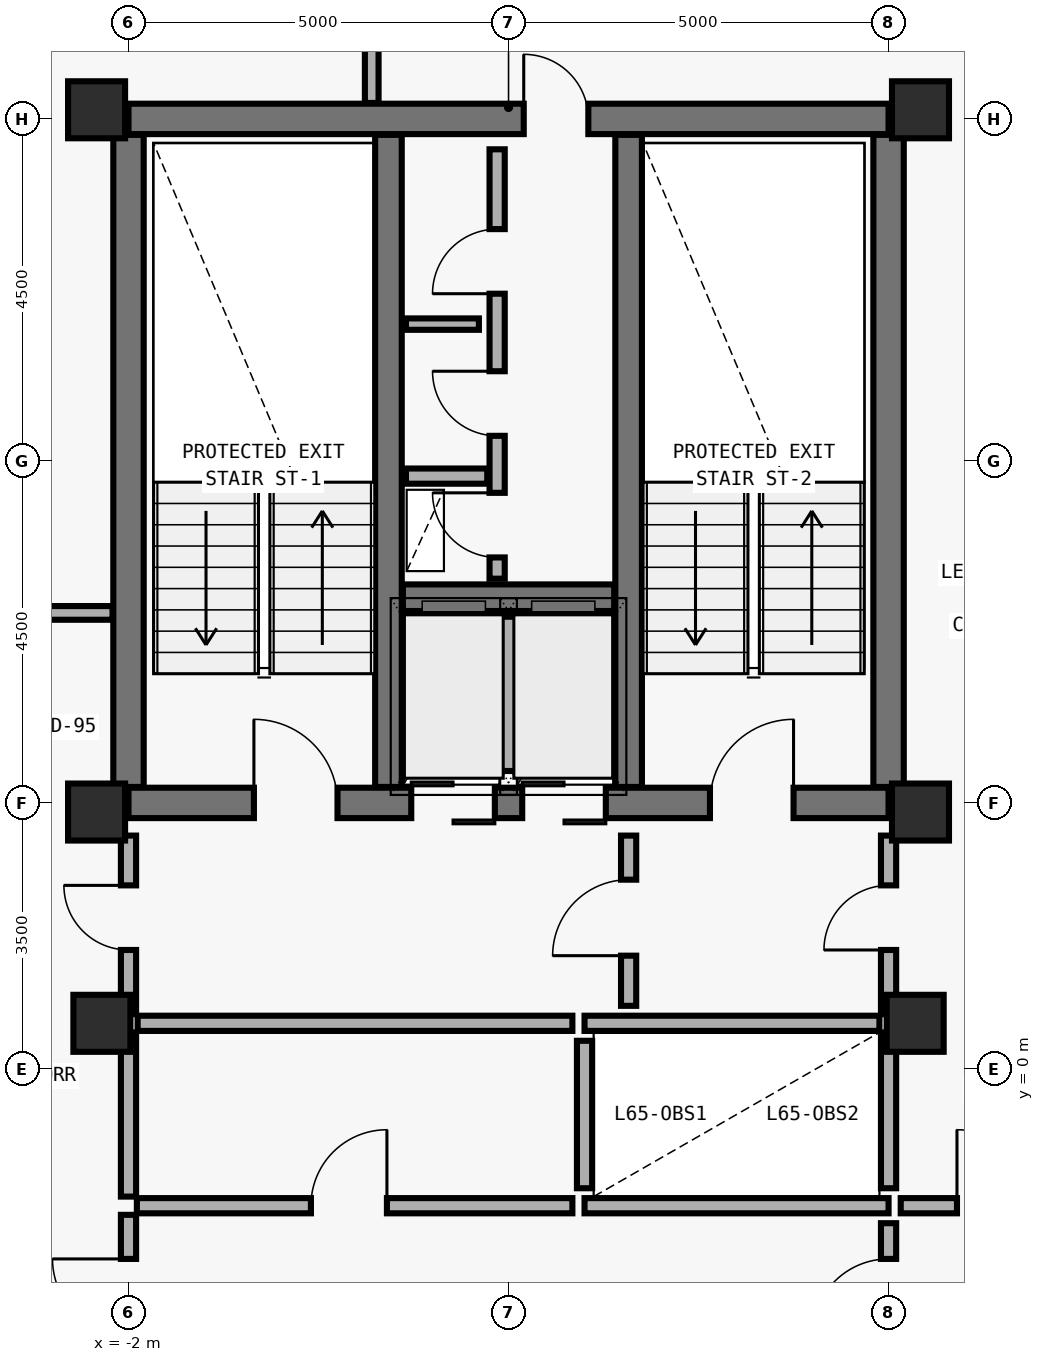
"""IFC4 building model, lengths in metres.
Left out: names, types, materials, properties, quantities, classifications, styles, units other than length and angle.
Written with IfcOpenShell. Run it as: python <this file> out.ifc"""

import sys

from ifc_helpers import new_model, si_unit, direction, frame, frame_2d, origin, origin_2d, place, context, subcontext, project, spatial, rectangle, extrude, element, fill, save


model = new_model("IFC4")
c1 = context("Model", 3, precision=1e-05, world=origin(), true_north=direction((0.0, 1.0)))
c2 = subcontext(c1, "Body", "Model", "MODEL_VIEW")
j1 = project(units=[si_unit("LENGTHUNIT", "METRE"), si_unit("PLANEANGLEUNIT", "RADIAN")], contexts=[c1])
p1 = place(None, origin())
s1 = spatial("IfcSite", under=j1, at=p1, CompositionType="ELEMENT")
p2 = place(p1, origin())
s2 = spatial("IfcBuilding", under=s1, at=p2, CompositionType="ELEMENT")
p3 = place(p2, frame((0.0, 0.0, 256.2)))
s3 = spatial("IfcBuildingStorey", under=s2, at=p3, CompositionType="ELEMENT", Elevation=256.2)
p4 = place(p3, frame((-2.0, 3.5, 0.0), z_axis=(0.0, 0.0, 1.0), x_axis=(1.0, 0.0, 0.0)))
e1 = element("IfcWall", 1, at=p4, inside=s3, PredefinedType="SHEAR", context=c2, shape_type="SweptSolid", body=[
    extrude(rectangle(XDim=10.0, YDim=0.4, at=frame_2d((5.0, 0.0))), origin(), (0.0, 0.0, 1.0), 3.592),
])
p5 = place(p4, frame((1.65, 0.0, 0.0)))
e2 = element("IfcOpeningElement", 2, at=p5, cuts=e1, PredefinedType="OPENING", context=c2, shape_type="SweptSolid", body=[
    extrude(rectangle(XDim=1.1, YDim=2.15, at=frame_2d((0.55, 1.075))), frame((0.0, 0.21, 0.0), z_axis=(0.0, -1.0, 0.0), x_axis=(1.0, 0.0, 0.0)), (0.0, 0.0, 1.0), 0.42),
])
p6 = place(p4, frame((7.65, 0.0, 0.0)))
e3 = element("IfcOpeningElement", 3, at=p6, cuts=e1, PredefinedType="OPENING", context=c2, shape_type="SweptSolid", body=[
    extrude(rectangle(XDim=1.1, YDim=2.15, at=frame_2d((0.55, 1.075))), frame((0.0, 0.21, 0.0), z_axis=(0.0, -1.0, 0.0), x_axis=(1.0, 0.0, 0.0)), (0.0, 0.0, 1.0), 0.42),
])
p7 = place(p4, frame((3.72, 0.0, 0.0)))
e4 = element("IfcOpeningElement", 4, at=p7, cuts=e1, PredefinedType="OPENING", context=c2, shape_type="SweptSolid", body=[
    extrude(rectangle(XDim=1.1, YDim=2.2, at=frame_2d((0.55, 1.1))), frame((0.0, 0.21, 0.0), z_axis=(0.0, -1.0, 0.0), x_axis=(1.0, 0.0, 0.0)), (0.0, 0.0, 1.0), 0.42),
])
p8 = place(p4, frame((5.18, 0.0, 0.0)))
e5 = element("IfcOpeningElement", 5, at=p8, cuts=e1, PredefinedType="OPENING", context=c2, shape_type="SweptSolid", body=[
    extrude(rectangle(XDim=1.1, YDim=2.2, at=frame_2d((0.55, 1.1))), frame((0.0, 0.21, 0.0), z_axis=(0.0, -1.0, 0.0), x_axis=(1.0, 0.0, 0.0)), (0.0, 0.0, 1.0), 0.42),
])
p9 = place(p3, frame((-2.0, 12.5, 0.0), z_axis=(0.0, 0.0, 1.0), x_axis=(1.0, 0.0, 0.0)))
e6 = element("IfcWall", 6, at=p9, inside=s3, PredefinedType="SHEAR", context=c2, shape_type="SweptSolid", body=[
    extrude(rectangle(XDim=10.0, YDim=0.4, at=frame_2d((5.0, 0.0))), origin(), (0.0, 0.0, 1.0), 3.592),
])
p10 = place(p9, frame((5.2, 0.0, 0.0)))
e7 = element("IfcOpeningElement", 7, at=p10, cuts=e6, PredefinedType="OPENING", context=c2, shape_type="SweptSolid", body=[
    extrude(rectangle(XDim=0.85, YDim=2.1, at=frame_2d((0.425, 1.05))), frame((0.0, 0.21, 0.0), z_axis=(0.0, -1.0, 0.0), x_axis=(1.0, 0.0, 0.0)), (0.0, 0.0, 1.0), 0.42),
])
for number, where, z_axis, x_axis in (
    (8, (-2.0, 3.71, 0.0), (0.0, 0.0, 1.0), (0.0, 1.0, 0.0)),
    (9, (8.0, 3.71, 0.0), (0.0, 0.0, 1.0), (0.0, 1.0, 0.0)),
):
    element("IfcWall", number, at=place(p3, frame(where, z_axis=z_axis, x_axis=x_axis)), inside=s3, PredefinedType="SHEAR", context=c2, shape_type="SweptSolid", body=[
        extrude(rectangle(XDim=8.58, YDim=0.4, at=frame_2d((4.29, 0.0))), origin(), (0.0, 0.0, 1.0), 3.592),
    ])
for number, where, z_axis, x_axis in (
    (10, (1.42, 3.71, 0.0), (0.0, 0.0, 1.0), (0.0, 1.0, 0.0)),
    (11, (4.58, 3.71, 0.0), (0.0, 0.0, 1.0), (0.0, 1.0, 0.0)),
):
    element("IfcWall", number, at=place(p3, frame(where, z_axis=z_axis, x_axis=x_axis)), inside=s3, PredefinedType="SHEAR", context=c2, shape_type="SweptSolid", body=[
        extrude(rectangle(XDim=8.58, YDim=0.35, at=frame_2d((4.29, 0.0))), origin(), (0.0, 0.0, 1.0), 3.592),
    ])
p11 = place(p3, frame((1.61, 6.2, 0.0), z_axis=(0.0, 0.0, 1.0), x_axis=(1.0, 0.0, 0.0)))
e12 = element("IfcWall", 12, at=p11, inside=s3, PredefinedType="SHEAR", context=c2, shape_type="SweptSolid", body=[
    extrude(rectangle(XDim=2.78, YDim=0.35, at=frame_2d((1.39, 0.0))), origin(), (0.0, 0.0, 1.0), 3.592),
])
for number, where, z_axis, x_axis in (
    (13, (-2.42, 12.62, 0.0), (0.0, 0.0, 1.0), (1.0, 0.0, 0.0)),
    (14, (8.42, 12.62, 0.0), (0.0, 0.0, 1.0), (1.0, 0.0, 0.0)),
    (15, (-2.42, 3.38, 0.0), (0.0, 0.0, 1.0), (1.0, 0.0, 0.0)),
    (16, (8.42, 3.38, 0.0), (0.0, 0.0, 1.0), (1.0, 0.0, 0.0)),
    (17, (-2.35, 0.6, 0.0), (0.0, 0.0, 1.0), (1.0, 0.0, 0.0)),
    (18, (8.35, 0.6, 0.0), (0.0, 0.0, 1.0), (1.0, 0.0, 0.0)),
):
    element("IfcColumn", number, at=place(p3, frame(where, z_axis=z_axis, x_axis=x_axis)), inside=s3, PredefinedType="COLUMN", context=c2, shape_type="SweptSolid", body=[
        extrude(rectangle(XDim=0.75, YDim=0.75, at=origin_2d()), origin(), (0.0, 0.0, 1.0), 3.575),
    ])
p12 = place(p3, frame((3.0, 3.92, 0.0), z_axis=(0.0, 0.0, 1.0), x_axis=(0.0, 1.0, 0.0)))
e19 = element("IfcWall", 19, at=p12, inside=s3, PredefinedType="SOLIDWALL", context=c2, shape_type="SweptSolid", body=[
    extrude(rectangle(XDim=2.03, YDim=0.2, at=frame_2d((1.015, 0.0))), origin(), (0.0, 0.0, 1.0), 3.36),
])
p13 = place(p3, frame((1.65, 7.8, 0.0), z_axis=(0.0, 0.0, 1.0), x_axis=(1.0, 0.0, 0.0)))
e20 = element("IfcWall", 20, at=p13, inside=s3, PredefinedType="SOLIDWALL", context=c2, shape_type="SweptSolid", body=[
    extrude(rectangle(XDim=1.07, YDim=0.2, at=frame_2d((0.535, 0.0))), origin(), (0.0, 0.0, 1.0), 3.36),
])
p14 = place(p3, frame((4.0, 0.6, 0.0), z_axis=(0.0, 0.0, 1.0), x_axis=(1.0, 0.0, 0.0)))
e21 = element("IfcWall", 21, at=p14, inside=s3, PredefinedType="SOLIDWALL", context=c2, shape_type="SweptSolid", body=[
    extrude(rectangle(XDim=3.88, YDim=0.2, at=frame_2d((1.94, 0.0))), origin(), (0.0, 0.0, 1.0), 3.072),
])
p15 = place(p3, frame((4.0, -1.8, 0.0), z_axis=(0.0, 0.0, 1.0), x_axis=(1.0, 0.0, 0.0)))
e22 = element("IfcWall", 22, at=p15, inside=s3, PredefinedType="SOLIDWALL", context=c2, shape_type="SweptSolid", body=[
    extrude(rectangle(XDim=4.0, YDim=0.2, at=frame_2d((2.0, 0.0))), origin(), (0.0, 0.0, 1.0), 3.36),
])
p16 = place(p3, frame((4.0, -1.57, 0.0), z_axis=(0.0, 0.0, 1.0), x_axis=(0.0, 1.0, 0.0)))
e23 = element("IfcWall", 23, at=p16, inside=s3, PredefinedType="SOLIDWALL", context=c2, shape_type="SweptSolid", body=[
    extrude(rectangle(XDim=1.94, YDim=0.2, at=frame_2d((0.97, 0.0))), origin(), (0.0, 0.0, 1.0), 3.36),
])
p17 = place(p3, frame((8.0, -1.57, 0.0), z_axis=(0.0, 0.0, 1.0), x_axis=(0.0, 1.0, 0.0)))
e24 = element("IfcWall", 24, at=p17, inside=s3, PredefinedType="SOLIDWALL", context=c2, shape_type="SweptSolid", body=[
    extrude(rectangle(XDim=2.05, YDim=0.2, at=frame_2d((1.025, 0.0))), origin(), (0.0, 0.0, 1.0), 3.072),
])
p18 = place(p3, frame((2.85, 6.45, 0.0), z_axis=(0.0, 0.0, 1.0), x_axis=(0.0, 1.0, 0.0)))
e25 = element("IfcWall", 25, at=p18, inside=s3, PredefinedType="MOVABLE", context=c2, shape_type="SweptSolid", body=[
    extrude(rectangle(XDim=5.65, YDim=0.2, at=frame_2d((2.825, 0.0))), origin(), (0.0, 0.0, 1.0), 3.36),
])
p19 = place(p18, frame((1.88, 0.0, 0.0)))
e26 = element("IfcOpeningElement", 26, at=p19, cuts=e25, PredefinedType="OPENING", context=c2, shape_type="SweptSolid", body=[
    extrude(rectangle(XDim=0.85, YDim=2.05, at=frame_2d((0.425, 1.025))), frame((0.0, 0.11, 0.0), z_axis=(0.0, -1.0, 0.0), x_axis=(1.0, 0.0, 0.0)), (0.0, 0.0, 1.0), 0.22),
])
p20 = place(p18, frame((3.75, 0.0, 0.0)))
e27 = element("IfcOpeningElement", 27, at=p20, cuts=e25, PredefinedType="OPENING", context=c2, shape_type="SweptSolid", body=[
    extrude(rectangle(XDim=0.85, YDim=2.1, at=frame_2d((0.425, 1.05))), frame((0.0, 0.11, 0.0), z_axis=(0.0, -1.0, 0.0), x_axis=(1.0, 0.0, 0.0)), (0.0, 0.0, 1.0), 0.22),
])
p21 = place(p18, frame((0.28, 0.0, 0.0)))
e28 = element("IfcOpeningElement", 28, at=p21, cuts=e25, PredefinedType="OPENING", context=c2, shape_type="SweptSolid", body=[
    extrude(rectangle(XDim=0.85, YDim=2.1, at=frame_2d((0.425, 1.05))), frame((0.0, 0.11, 0.0), z_axis=(0.0, -1.0, 0.0), x_axis=(1.0, 0.0, 0.0)), (0.0, 0.0, 1.0), 0.22),
])
p22 = place(p3, frame((4.58, 0.83, 0.0), z_axis=(0.0, 0.0, 1.0), x_axis=(0.0, 1.0, 0.0)))
e29 = element("IfcWall", 29, at=p22, inside=s3, PredefinedType="MOVABLE", context=c2, shape_type="SweptSolid", body=[
    extrude(rectangle(XDim=2.24, YDim=0.2, at=frame_2d((1.12, 0.0))), origin(), (0.0, 0.0, 1.0), 3.36),
])
p23 = place(p22, frame((0.66, 0.0, 0.0)))
e30 = element("IfcOpeningElement", 30, at=p23, cuts=e29, PredefinedType="OPENING", context=c2, shape_type="SweptSolid", body=[
    extrude(rectangle(XDim=1.0, YDim=2.1, at=frame_2d((0.5, 1.05))), frame((0.0, 0.11, 0.0), z_axis=(0.0, -1.0, 0.0), x_axis=(1.0, 0.0, 0.0)), (0.0, 0.0, 1.0), 0.22),
])
p24 = place(p3, frame((-2.0, 0.72, 0.0), z_axis=(0.0, 0.0, 1.0), x_axis=(0.0, 1.0, 0.0)))
e31 = element("IfcWall", 31, at=p24, inside=s3, PredefinedType="MOVABLE", context=c2, shape_type="SweptSolid", body=[
    extrude(rectangle(XDim=2.35, YDim=0.2, at=frame_2d((1.175, 0.0))), origin(), (0.0, 0.0, 1.0), 2.692),
])
p25 = place(p24, frame((0.845, 0.0, 0.0)))
e32 = element("IfcOpeningElement", 32, at=p25, cuts=e31, PredefinedType="OPENING", context=c2, shape_type="SweptSolid", body=[
    extrude(rectangle(XDim=0.85, YDim=2.1, at=frame_2d((0.425, 1.05))), frame((0.0, 0.11, 0.0), z_axis=(0.0, -1.0, 0.0), x_axis=(1.0, 0.0, 0.0)), (0.0, 0.0, 1.0), 0.22),
])
p26 = place(p3, frame((8.0, 0.72, 0.0), z_axis=(0.0, 0.0, 1.0), x_axis=(0.0, 1.0, 0.0)))
e33 = element("IfcWall", 33, at=p26, inside=s3, PredefinedType="MOVABLE", context=c2, shape_type="SweptSolid", body=[
    extrude(rectangle(XDim=2.35, YDim=0.2, at=frame_2d((1.175, 0.0))), origin(), (0.0, 0.0, 1.0), 2.692),
])
p27 = place(p26, frame((0.845, 0.0, 0.0)))
e34 = element("IfcOpeningElement", 34, at=p27, cuts=e33, PredefinedType="OPENING", context=c2, shape_type="SweptSolid", body=[
    extrude(rectangle(XDim=0.85, YDim=2.1, at=frame_2d((0.425, 1.05))), frame((0.0, 0.11, 0.0), z_axis=(0.0, -1.0, 0.0), x_axis=(1.0, 0.0, 0.0)), (0.0, 0.0, 1.0), 0.22),
])
p28 = place(p3, frame((-2.0, -4.08, 0.0), z_axis=(0.0, 0.0, 1.0), x_axis=(0.0, 1.0, 0.0)))
e35 = element("IfcWall", 35, at=p28, inside=s3, PredefinedType="MOVABLE", context=c2, shape_type="SweptSolid", body=[
    extrude(rectangle(XDim=2.16, YDim=0.2, at=frame_2d((1.08, 0.0))), origin(), (0.0, 0.0, 1.0), 3.072),
])
p29 = place(p28, frame((0.58, 0.0, 0.0)))
e36 = element("IfcOpeningElement", 36, at=p29, cuts=e35, PredefinedType="OPENING", context=c2, shape_type="SweptSolid", body=[
    extrude(rectangle(XDim=1.0, YDim=2.1, at=frame_2d((0.5, 1.05))), frame((0.0, 0.11, 0.0), z_axis=(0.0, -1.0, 0.0), x_axis=(1.0, 0.0, 0.0)), (0.0, 0.0, 1.0), 0.22),
])
p30 = place(p3, frame((8.0, -3.97, 0.0), z_axis=(0.0, 0.0, 1.0), x_axis=(0.0, 1.0, 0.0)))
e37 = element("IfcWall", 37, at=p30, inside=s3, PredefinedType="MOVABLE", context=c2, shape_type="SweptSolid", body=[
    extrude(rectangle(XDim=1.94, YDim=0.2, at=frame_2d((0.97, 0.0))), origin(), (0.0, 0.0, 1.0), 3.072),
])
p31 = place(p30, frame((0.47, 0.0, 0.0)))
e38 = element("IfcOpeningElement", 38, at=p31, cuts=e37, PredefinedType="OPENING", context=c2, shape_type="SweptSolid", body=[
    extrude(rectangle(XDim=1.0, YDim=2.1, at=frame_2d((0.5, 1.05))), frame((0.0, 0.11, 0.0), z_axis=(0.0, -1.0, 0.0), x_axis=(1.0, 0.0, 0.0)), (0.0, 0.0, 1.0), 0.22),
])
p32 = place(p3, frame((-1.89, -1.8, 0.0), z_axis=(0.0, 0.0, 1.0), x_axis=(1.0, 0.0, 0.0)))
e39 = element("IfcWall", 39, at=p32, inside=s3, PredefinedType="MOVABLE", context=c2, shape_type="SweptSolid", body=[
    extrude(rectangle(XDim=5.73, YDim=0.2, at=frame_2d((2.865, 0.0))), origin(), (0.0, 0.0, 1.0), 3.36),
])
p33 = place(p32, frame((2.29, 0.0, 0.0)))
e40 = element("IfcOpeningElement", 40, at=p33, cuts=e39, PredefinedType="OPENING", context=c2, shape_type="SweptSolid", body=[
    extrude(rectangle(XDim=1.0, YDim=2.1, at=frame_2d((0.5, 1.05))), frame((0.0, 0.11, 0.0), z_axis=(0.0, -1.0, 0.0), x_axis=(1.0, 0.0, 0.0)), (0.0, 0.0, 1.0), 0.22),
])
p34 = place(p3, frame((8.16, -1.8, 0.0), z_axis=(0.0, 0.0, 1.0), x_axis=(1.0, 0.0, 0.0)))
e41 = element("IfcWall", 41, at=p34, inside=s3, PredefinedType="MOVABLE", context=c2, shape_type="SweptSolid", body=[
    extrude(rectangle(XDim=2.64, YDim=0.2, at=frame_2d((1.32, 0.0))), origin(), (0.0, 0.0, 1.0), 3.36),
])
p35 = place(p34, frame((0.74, 0.0, 0.0)))
e42 = element("IfcOpeningElement", 42, at=p35, cuts=e41, PredefinedType="OPENING", context=c2, shape_type="SweptSolid", body=[
    extrude(rectangle(XDim=1.0, YDim=2.1, at=frame_2d((0.5, 1.05))), frame((0.0, 0.11, 0.0), z_axis=(0.0, -1.0, 0.0), x_axis=(1.0, 0.0, 0.0)), (0.0, 0.0, 1.0), 0.22),
])
p36 = place(p3, frame((1.65, 9.8, 0.0), z_axis=(0.0, 0.0, 1.0), x_axis=(1.0, 0.0, 0.0)))
e43 = element("IfcWall", 43, at=p36, inside=s3, PredefinedType="PARTITIONING", context=c2, shape_type="SweptSolid", body=[
    extrude(rectangle(XDim=0.96, YDim=0.15, at=frame_2d((0.48, 0.0))), origin(), (0.0, 0.0, 1.0), 3.36),
])
p37 = place(p3, frame((-1.88, 0.6, 0.0), z_axis=(0.0, 0.0, 1.0), x_axis=(1.0, 0.0, 0.0)))
e44 = element("IfcWall", 44, at=p37, inside=s3, PredefinedType="MOVABLE", context=c2, shape_type="SweptSolid", body=[
    extrude(rectangle(XDim=5.72, YDim=0.2, at=frame_2d((2.86, 0.0))), origin(), (0.0, 0.0, 1.0), 3.072),
])
p38 = place(p3, frame((-2.0, -1.68, 0.0), z_axis=(0.0, 0.0, 1.0), x_axis=(0.0, 1.0, 0.0)))
e45 = element("IfcWall", 45, at=p38, inside=s3, PredefinedType="MOVABLE", context=c2, shape_type="SweptSolid", body=[
    extrude(rectangle(XDim=2.16, YDim=0.2, at=frame_2d((1.08, 0.0))), origin(), (0.0, 0.0, 1.0), 3.072),
])
p39 = place(p3, frame((-2.21, 6.0, 0.0), z_axis=(0.0, 0.0, 1.0), x_axis=(-1.0, 0.0, 0.0)))
e46 = element("IfcWall", 46, at=p39, inside=s3, PredefinedType="PLUMBINGWALL", context=c2, shape_type="SweptSolid", body=[
    extrude(rectangle(XDim=2.29, YDim=0.18, at=frame_2d((1.145, 0.0))), origin(), (0.0, 0.0, 1.0), 3.36),
])
p40 = place(p3, frame((1.2, 14.6, 0.0), z_axis=(0.0, 0.0, 1.0), x_axis=(0.0, -1.0, 0.0)))
e47 = element("IfcWall", 47, at=p40, inside=s3, PredefinedType="PLUMBINGWALL", context=c2, shape_type="SweptSolid", body=[
    extrude(rectangle(XDim=1.89, YDim=0.18, at=frame_2d((0.945, 0.0))), origin(), (0.0, 0.0, 1.0), 3.36),
])
p41 = place(p5, origin())
e48 = element("IfcDoor", 48, at=p41, inside=s3, OperationType="SINGLE_SWING_LEFT", PredefinedType="DOOR", context=c2, shape_type="SweptSolid", body=[
    extrude(rectangle(XDim=1.1, YDim=2.15, at=frame_2d((0.55, 1.075))), frame((0.0, 0.025, 0.0), z_axis=(0.0, -1.0, 0.0), x_axis=(1.0, 0.0, 0.0)), (0.0, 0.0, 1.0), 0.05),
])
fill(e2, e48)
p42 = place(p6, origin())
e49 = element("IfcDoor", 49, at=p42, inside=s3, OperationType="SINGLE_SWING_RIGHT", PredefinedType="DOOR", context=c2, shape_type="SweptSolid", body=[
    extrude(rectangle(XDim=1.1, YDim=2.15, at=frame_2d((0.55, 1.075))), frame((0.0, 0.025, 0.0), z_axis=(0.0, -1.0, 0.0), x_axis=(1.0, 0.0, 0.0)), (0.0, 0.0, 1.0), 0.05),
])
fill(e3, e49)
p43 = place(p7, origin())
e50 = element("IfcDoor", 50, at=p43, inside=s3, OperationType="DOUBLE_DOOR_SLIDING", PredefinedType="DOOR", context=c2, shape_type="SweptSolid", body=[
    extrude(rectangle(XDim=1.1, YDim=2.2, at=frame_2d((0.55, 1.1))), frame((0.0, 0.025, 0.0), z_axis=(0.0, -1.0, 0.0), x_axis=(1.0, 0.0, 0.0)), (0.0, 0.0, 1.0), 0.05),
])
fill(e4, e50)
p44 = place(p8, origin())
e51 = element("IfcDoor", 51, at=p44, inside=s3, OperationType="DOUBLE_DOOR_SLIDING", PredefinedType="DOOR", context=c2, shape_type="SweptSolid", body=[
    extrude(rectangle(XDim=1.1, YDim=2.2, at=frame_2d((0.55, 1.1))), frame((0.0, 0.025, 0.0), z_axis=(0.0, -1.0, 0.0), x_axis=(1.0, 0.0, 0.0)), (0.0, 0.0, 1.0), 0.05),
])
fill(e5, e51)
p45 = place(p10, origin())
e52 = element("IfcDoor", 52, at=p45, inside=s3, OperationType="SINGLE_SWING_LEFT", PredefinedType="DOOR", context=c2, shape_type="SweptSolid", body=[
    extrude(rectangle(XDim=0.85, YDim=2.1, at=frame_2d((0.425, 1.05))), frame((0.0, 0.025, 0.0), z_axis=(0.0, -1.0, 0.0), x_axis=(1.0, 0.0, 0.0)), (0.0, 0.0, 1.0), 0.05),
])
fill(e7, e52)
p46 = place(p19, origin())
e53 = element("IfcDoor", 53, at=p46, inside=s3, OperationType="SINGLE_SWING_RIGHT", PredefinedType="DOOR", context=c2, shape_type="SweptSolid", body=[
    extrude(rectangle(XDim=0.85, YDim=2.05, at=frame_2d((0.425, 1.025))), frame((0.0, 0.025, 0.0), z_axis=(0.0, -1.0, 0.0), x_axis=(1.0, 0.0, 0.0)), (0.0, 0.0, 1.0), 0.05),
])
fill(e26, e53)
p47 = place(p20, origin())
e54 = element("IfcDoor", 54, at=p47, inside=s3, OperationType="SINGLE_SWING_LEFT", PredefinedType="DOOR", context=c2, shape_type="SweptSolid", body=[
    extrude(rectangle(XDim=0.85, YDim=2.1, at=frame_2d((0.425, 1.05))), frame((0.0, 0.025, 0.0), z_axis=(0.0, -1.0, 0.0), x_axis=(1.0, 0.0, 0.0)), (0.0, 0.0, 1.0), 0.05),
])
fill(e27, e54)
p48 = place(p21, origin())
e55 = element("IfcDoor", 55, at=p48, inside=s3, OperationType="SINGLE_SWING_RIGHT", PredefinedType="DOOR", context=c2, shape_type="SweptSolid", body=[
    extrude(rectangle(XDim=0.85, YDim=2.1, at=frame_2d((0.425, 1.05))), frame((0.0, 0.025, 0.0), z_axis=(0.0, -1.0, 0.0), x_axis=(1.0, 0.0, 0.0)), (0.0, 0.0, 1.0), 0.05),
])
fill(e28, e55)
p49 = place(p23, origin())
e56 = element("IfcDoor", 56, at=p49, inside=s3, OperationType="SINGLE_SWING_LEFT", PredefinedType="DOOR", context=c2, shape_type="SweptSolid", body=[
    extrude(rectangle(XDim=1.0, YDim=2.1, at=frame_2d((0.5, 1.05))), frame((0.0, 0.025, 0.0), z_axis=(0.0, -1.0, 0.0), x_axis=(1.0, 0.0, 0.0)), (0.0, 0.0, 1.0), 0.05),
])
fill(e30, e56)
p50 = place(p25, origin())
e57 = element("IfcDoor", 57, at=p50, inside=s3, OperationType="SINGLE_SWING_RIGHT", PredefinedType="DOOR", context=c2, shape_type="SweptSolid", body=[
    extrude(rectangle(XDim=0.85, YDim=2.1, at=frame_2d((0.425, 1.05))), frame((0.0, 0.025, 0.0), z_axis=(0.0, -1.0, 0.0), x_axis=(1.0, 0.0, 0.0)), (0.0, 0.0, 1.0), 0.05),
])
fill(e32, e57)
p51 = place(p27, origin())
e58 = element("IfcDoor", 58, at=p51, inside=s3, OperationType="SINGLE_SWING_LEFT", PredefinedType="DOOR", context=c2, shape_type="SweptSolid", body=[
    extrude(rectangle(XDim=0.85, YDim=2.1, at=frame_2d((0.425, 1.05))), frame((0.0, 0.025, 0.0), z_axis=(0.0, -1.0, 0.0), x_axis=(1.0, 0.0, 0.0)), (0.0, 0.0, 1.0), 0.05),
])
fill(e34, e58)
p52 = place(p29, origin())
e59 = element("IfcDoor", 59, at=p52, inside=s3, OperationType="SINGLE_SWING_RIGHT", PredefinedType="DOOR", context=c2, shape_type="SweptSolid", body=[
    extrude(rectangle(XDim=1.0, YDim=2.1, at=frame_2d((0.5, 1.05))), frame((0.0, 0.025, 0.0), z_axis=(0.0, -1.0, 0.0), x_axis=(1.0, 0.0, 0.0)), (0.0, 0.0, 1.0), 0.05),
])
fill(e36, e59)
p53 = place(p31, origin())
e60 = element("IfcDoor", 60, at=p53, inside=s3, OperationType="SINGLE_SWING_LEFT", PredefinedType="DOOR", context=c2, shape_type="SweptSolid", body=[
    extrude(rectangle(XDim=1.0, YDim=2.1, at=frame_2d((0.5, 1.05))), frame((0.0, 0.025, 0.0), z_axis=(0.0, -1.0, 0.0), x_axis=(1.0, 0.0, 0.0)), (0.0, 0.0, 1.0), 0.05),
])
fill(e38, e60)
p54 = place(p33, origin())
e61 = element("IfcDoor", 61, at=p54, inside=s3, OperationType="SINGLE_SWING_RIGHT", PredefinedType="DOOR", context=c2, shape_type="SweptSolid", body=[
    extrude(rectangle(XDim=1.0, YDim=2.1, at=frame_2d((0.5, 1.05))), frame((0.0, 0.025, 0.0), z_axis=(0.0, -1.0, 0.0), x_axis=(1.0, 0.0, 0.0)), (0.0, 0.0, 1.0), 0.05),
])
fill(e40, e61)
p55 = place(p35, origin())
e62 = element("IfcDoor", 62, at=p55, inside=s3, OperationType="SINGLE_SWING_LEFT", PredefinedType="DOOR", context=c2, shape_type="SweptSolid", body=[
    extrude(rectangle(XDim=1.0, YDim=2.1, at=frame_2d((0.5, 1.05))), frame((0.0, 0.025, 0.0), z_axis=(0.0, -1.0, 0.0), x_axis=(1.0, 0.0, 0.0)), (0.0, 0.0, 1.0), 0.05),
])
fill(e42, e62)
save(model, sys.argv[1])
